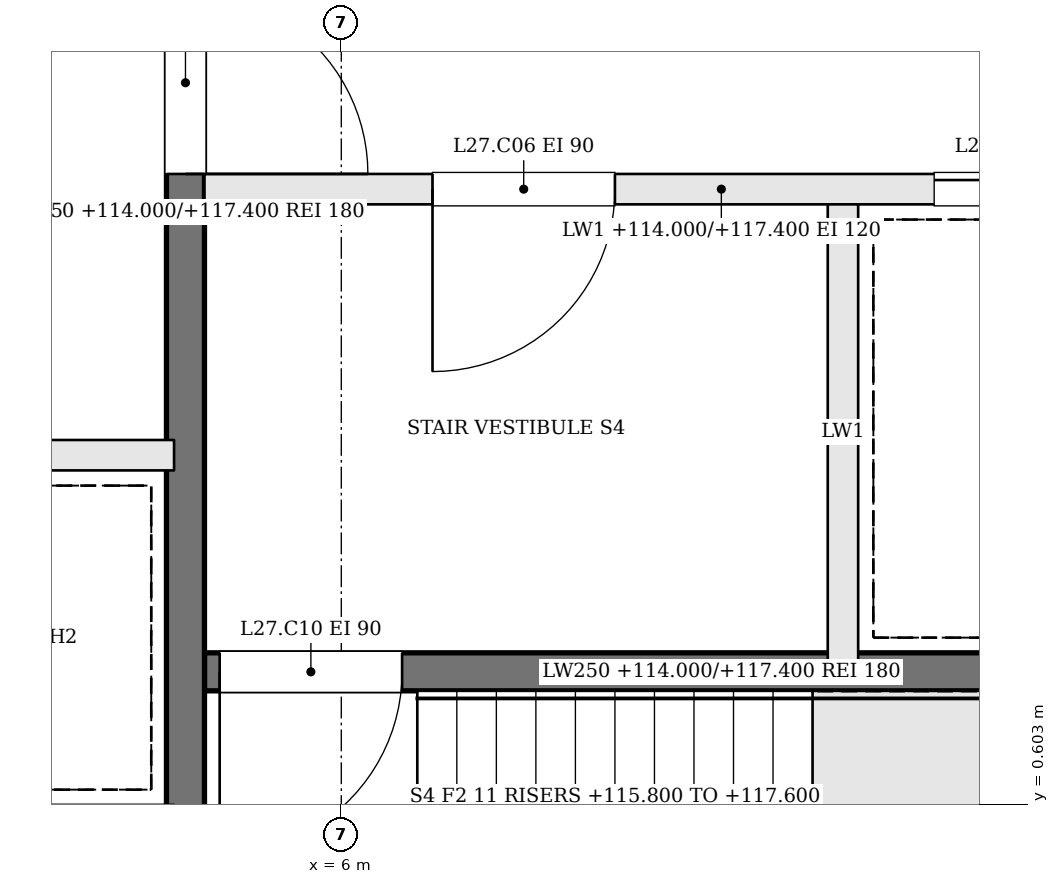
"""IFC4 building model, lengths in metres.
Left out: names, types, materials, properties, quantities, classifications, styles, units other than length and angle.
Written with IfcOpenShell. Run it as: python <this file> out.ifc"""

import sys

from ifc_helpers import new_model, si_unit, direction, frame, frame_2d, origin, place, context, subcontext, project, spatial, rectangle, extrude, element, fill, save


model = new_model("IFC4")
c1 = context("Model", 3, precision=1e-05, world=origin(), true_north=direction((0.0, 1.0)))
c2 = subcontext(c1, "Body", "Model", "MODEL_VIEW")
j1 = project(units=[si_unit("LENGTHUNIT", "METRE"), si_unit("PLANEANGLEUNIT", "RADIAN")], contexts=[c1])
p1 = place(None, origin())
s1 = spatial("IfcSite", under=j1, at=p1, CompositionType="ELEMENT")
p2 = place(p1, origin())
s2 = spatial("IfcBuilding", under=s1, at=p2, CompositionType="ELEMENT")
p3 = place(p2, frame((0.0, 0.0, 114.0)))
s3 = spatial("IfcBuildingStorey", under=s2, at=p3, CompositionType="ELEMENT", Elevation=114.0)
p4 = place(p3, frame((11.9, 4.65, 0.0), z_axis=(0.0, 0.0, 1.0), x_axis=(-1.0, 0.0, 0.0)))
e1 = element("IfcWall", 1, at=p4, inside=s3, PredefinedType="SOLIDWALL", context=c2, shape_type="SweptSolid", body=[
    extrude(rectangle(XDim=6.8, YDim=0.2, at=frame_2d((3.4, 0.0))), origin(), (0.0, 0.0, 1.0), 3.4),
])
p5 = place(p4, frame((4.1, 0.0, 0.0)))
e2 = element("IfcOpeningElement", 2, at=p5, cuts=e1, PredefinedType="OPENING", context=c2, shape_type="SweptSolid", body=[
    extrude(rectangle(XDim=1.2, YDim=2.1, at=frame_2d((0.6, 1.05))), frame((0.0, 0.11, 0.0), z_axis=(0.0, -1.0, 0.0), x_axis=(1.0, 0.0, 0.0)), (0.0, 0.0, 1.0), 0.22),
])
p6 = place(p4, frame((0.8, 0.0, 0.0)))
e3 = element("IfcOpeningElement", 3, at=p6, cuts=e1, PredefinedType="OPENING", context=c2, shape_type="SweptSolid", body=[
    extrude(rectangle(XDim=1.2, YDim=2.1, at=frame_2d((0.6, 1.05))), frame((0.0, 0.11, 0.0), z_axis=(0.0, -1.0, 0.0), x_axis=(1.0, 0.0, 0.0)), (0.0, 0.0, 1.0), 0.22),
])
p7 = place(p3, frame((11.9, 1.475, 0.0), z_axis=(0.0, 0.0, 1.0), x_axis=(-1.0, 0.0, 0.0)))
e4 = element("IfcWall", 4, at=p7, inside=s3, PredefinedType="SOLIDWALL", context=c2, shape_type="SweptSolid", body=[
    extrude(rectangle(XDim=6.8, YDim=0.25, at=frame_2d((3.4, 0.0))), origin(), (0.0, 0.0, 1.0), 3.4),
])
p8 = place(p7, frame((5.5, 0.0, 0.0)))
e5 = element("IfcOpeningElement", 5, at=p8, cuts=e4, PredefinedType="OPENING", context=c2, shape_type="SweptSolid", body=[
    extrude(rectangle(XDim=1.2, YDim=2.1, at=frame_2d((0.6, 1.05))), frame((0.0, 0.135, 0.0), z_axis=(0.0, -1.0, 0.0), x_axis=(1.0, 0.0, 0.0)), (0.0, 0.0, 1.0), 0.27),
])
p9 = place(p3, frame((9.3, 4.55, 0.0), z_axis=(0.0, 0.0, 1.0), x_axis=(0.0, -1.0, 0.0)))
e6 = element("IfcWall", 6, at=p9, inside=s3, PredefinedType="SOLIDWALL", context=c2, shape_type="SweptSolid", body=[
    extrude(rectangle(XDim=3.0, YDim=0.2, at=frame_2d((1.5, 0.0))), origin(), (0.0, 0.0, 1.0), 3.4),
])
p10 = place(p3, frame((4.975, 10.9, 0.0), z_axis=(0.0, 0.0, 1.0), x_axis=(0.0, -1.0, 0.0)))
e7 = element("IfcWall", 7, at=p10, inside=s3, PredefinedType="SOLIDWALL", context=c2, shape_type="SweptSolid", body=[
    extrude(rectangle(XDim=12.8, YDim=0.25, at=frame_2d((6.4, 0.0))), origin(), (0.0, 0.0, 1.0), 3.4),
])
p11 = place(p10, frame((4.95, 0.0, 0.0)))
e8 = element("IfcOpeningElement", 8, at=p11, cuts=e7, PredefinedType="OPENING", context=c2, shape_type="SweptSolid", body=[
    extrude(rectangle(XDim=1.2, YDim=2.1, at=frame_2d((0.6, 1.05))), frame((0.0, 0.135, 0.0), z_axis=(0.0, -1.0, 0.0), x_axis=(1.0, 0.0, 0.0)), (0.0, 0.0, 1.0), 0.27),
])
p12 = place(p3, frame((-4.9, 2.9, 0.0), z_axis=(0.0, 0.0, 1.0), x_axis=(1.0, 0.0, 0.0)))
e9 = element("IfcWall", 9, at=p12, inside=s3, PredefinedType="SOLIDWALL", context=c2, shape_type="SweptSolid", body=[
    extrude(rectangle(XDim=9.8, YDim=0.2, at=frame_2d((4.9, 0.0))), origin(), (0.0, 0.0, 1.0), 3.4),
])
p13 = place(p12, frame((0.675, 0.0, 0.0)))
e10 = element("IfcOpeningElement", 10, at=p13, cuts=e9, PredefinedType="OPENING", context=c2, shape_type="SweptSolid", body=[
    extrude(rectangle(XDim=1.1, YDim=2.1, at=frame_2d((0.55, 1.05))), frame((0.0, 0.11, 0.0), z_axis=(0.0, -1.0, 0.0), x_axis=(1.0, 0.0, 0.0)), (0.0, 0.0, 1.0), 0.22),
])
p14 = place(p12, frame((3.125, 0.0, 0.0)))
e11 = element("IfcOpeningElement", 11, at=p14, cuts=e9, PredefinedType="OPENING", context=c2, shape_type="SweptSolid", body=[
    extrude(rectangle(XDim=1.1, YDim=2.1, at=frame_2d((0.55, 1.05))), frame((0.0, 0.11, 0.0), z_axis=(0.0, -1.0, 0.0), x_axis=(1.0, 0.0, 0.0)), (0.0, 0.0, 1.0), 0.22),
])
p15 = place(p11, origin())
e12 = element("IfcDoor", 12, at=p15, inside=s3, OperationType="SINGLE_SWING_RIGHT", PredefinedType="DOOR", context=c2, shape_type="SweptSolid", body=[
    extrude(rectangle(XDim=1.2, YDim=2.1, at=frame_2d((0.6, 1.05))), frame((0.0, 0.025, 0.0), z_axis=(0.0, -1.0, 0.0), x_axis=(1.0, 0.0, 0.0)), (0.0, 0.0, 1.0), 0.05),
])
fill(e8, e12)
p16 = place(p5, origin())
e13 = element("IfcDoor", 13, at=p16, inside=s3, OperationType="SINGLE_SWING_RIGHT", PredefinedType="DOOR", context=c2, shape_type="SweptSolid", body=[
    extrude(rectangle(XDim=1.2, YDim=2.1, at=frame_2d((0.6, 1.05))), frame((0.0, 0.025, 0.0), z_axis=(0.0, -1.0, 0.0), x_axis=(1.0, 0.0, 0.0)), (0.0, 0.0, 1.0), 0.05),
])
fill(e2, e13)
p17 = place(p8, origin())
e14 = element("IfcDoor", 14, at=p17, inside=s3, OperationType="SINGLE_SWING_RIGHT", PredefinedType="DOOR", context=c2, shape_type="SweptSolid", body=[
    extrude(rectangle(XDim=1.2, YDim=2.1, at=frame_2d((0.6, 1.05))), frame((0.0, 0.025, 0.0), z_axis=(0.0, -1.0, 0.0), x_axis=(1.0, 0.0, 0.0)), (0.0, 0.0, 1.0), 0.05),
])
fill(e5, e14)
p18 = place(p6, origin())
e15 = element("IfcDoor", 15, at=p18, inside=s3, OperationType="SLIDING_TO_RIGHT", PredefinedType="DOOR", context=c2, shape_type="SweptSolid", body=[
    extrude(rectangle(XDim=1.2, YDim=2.1, at=frame_2d((0.6, 1.05))), frame((0.0, 0.025, 0.0), z_axis=(0.0, -1.0, 0.0), x_axis=(1.0, 0.0, 0.0)), (0.0, 0.0, 1.0), 0.05),
])
fill(e3, e15)
save(model, sys.argv[1])
